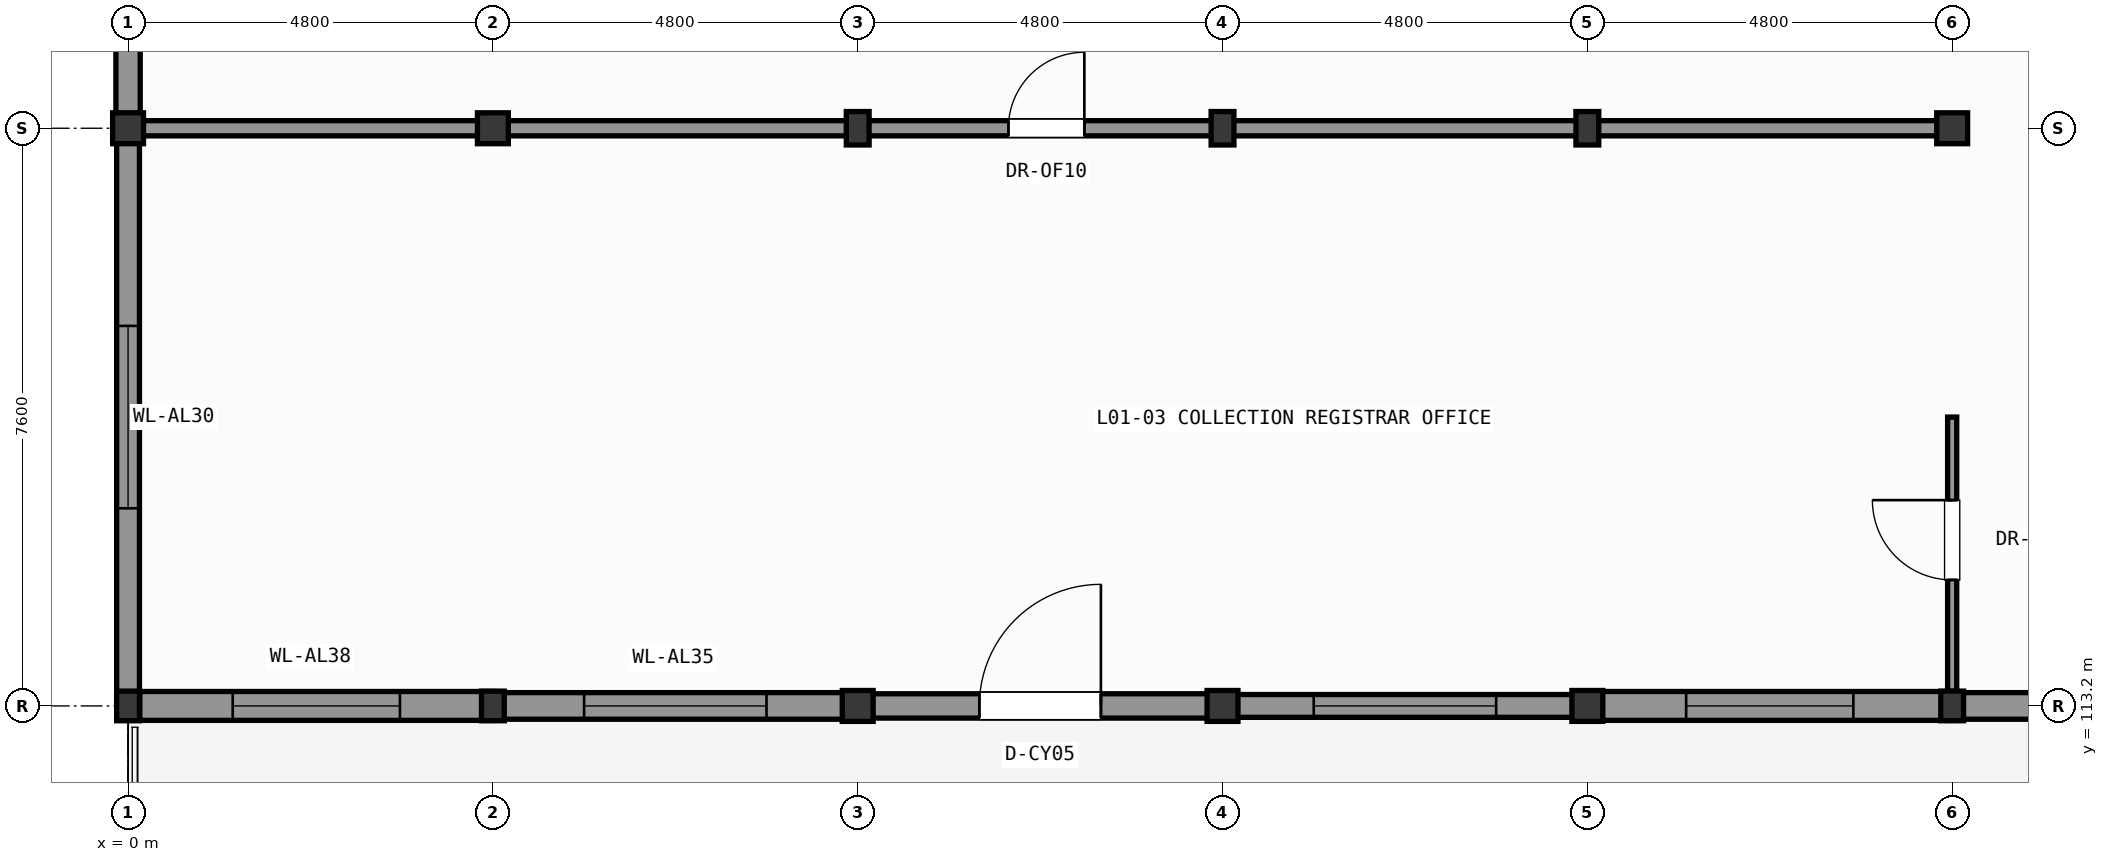
"""IFC4 building model, lengths in metres.
Left out: names, types, materials, properties, quantities, classifications, styles, units other than length and angle.
Written with IfcOpenShell. Run it as: python <this file> out.ifc"""

import sys

from ifc_helpers import new_model, si_unit, direction, frame, frame_2d, origin, origin_2d, place, context, subcontext, project, spatial, rectangle, hollow_circle, i_section, extrude, element, fill, save


model = new_model("IFC4")
c1 = context("Model", 3, precision=1e-05, world=origin(), true_north=direction((0.0, 1.0)))
c2 = subcontext(c1, "Body", "Model", "MODEL_VIEW")
j1 = project(units=[si_unit("LENGTHUNIT", "METRE"), si_unit("PLANEANGLEUNIT", "RADIAN")], contexts=[c1])
p1 = place(None, origin())
s1 = spatial("IfcSite", under=j1, at=p1, CompositionType="ELEMENT")
p2 = place(p1, origin())
s2 = spatial("IfcBuilding", under=s1, at=p2, CompositionType="ELEMENT")
p3 = place(p2, origin())
s3 = spatial("IfcBuildingStorey", under=s2, at=p3, CompositionType="ELEMENT", Elevation=0.0)
p4 = place(p3, frame((0.0, 113.2, 0.0), z_axis=(0.0, 0.0, 1.0), x_axis=(1.0, 0.0, 0.0)))
e1 = element("IfcColumn", 1, at=p4, inside=s3, PredefinedType="COLUMN", context=c2, shape_type="SweptSolid", body=[
    extrude(i_section(OverallWidth=0.3, OverallDepth=0.39, WebThickness=0.011, FlangeThickness=0.019, FilletRadius=0.027, at=origin_2d()), origin(), (0.0, 0.0, 1.0), 7.8),
])
p5 = place(p3, frame((0.0, 120.8, 0.0), z_axis=(0.0, 0.0, 1.0), x_axis=(1.0, 0.0, 0.0)))
e2 = element("IfcColumn", 2, at=p5, inside=s3, PredefinedType="COLUMN", context=c2, shape_type="SweptSolid", body=[
    extrude(hollow_circle(Radius=0.203, WallThickness=0.02, at=origin_2d()), origin(), (0.0, 0.0, 1.0), 7.8),
])
p6 = place(p3, frame((4.8, 113.2, 0.0), z_axis=(0.0, 0.0, 1.0), x_axis=(1.0, 0.0, 0.0)))
e3 = element("IfcColumn", 3, at=p6, inside=s3, PredefinedType="COLUMN", context=c2, shape_type="SweptSolid", body=[
    extrude(i_section(OverallWidth=0.3, OverallDepth=0.39, WebThickness=0.011, FlangeThickness=0.019, FilletRadius=0.027, at=origin_2d()), origin(), (0.0, 0.0, 1.0), 7.8),
])
for number, where, z_axis, x_axis in (
    (4, (4.8, 120.8, 0.0), (0.0, 0.0, 1.0), (1.0, 0.0, 0.0)),
    (5, (9.6, 113.2, 0.0), (0.0, 0.0, 1.0), (1.0, 0.0, 0.0)),
):
    element("IfcColumn", number, at=place(p3, frame(where, z_axis=z_axis, x_axis=x_axis)), inside=s3, PredefinedType="COLUMN", context=c2, shape_type="SweptSolid", body=[
        extrude(hollow_circle(Radius=0.203, WallThickness=0.02, at=origin_2d()), origin(), (0.0, 0.0, 1.0), 7.8),
    ])
p7 = place(p3, frame((9.6, 120.8, 0.0), z_axis=(0.0, 0.0, 1.0), x_axis=(1.0, 0.0, 0.0)))
e6 = element("IfcColumn", 6, at=p7, inside=s3, PredefinedType="COLUMN", context=c2, shape_type="SweptSolid", body=[
    extrude(i_section(OverallWidth=0.3, OverallDepth=0.44, WebThickness=0.011, FlangeThickness=0.021, FilletRadius=0.027, at=origin_2d()), origin(), (0.0, 0.0, 1.0), 7.8),
])
p8 = place(p3, frame((14.4, 113.2, 0.0), z_axis=(0.0, 0.0, 1.0), x_axis=(1.0, 0.0, 0.0)))
e7 = element("IfcColumn", 7, at=p8, inside=s3, PredefinedType="COLUMN", context=c2, shape_type="SweptSolid", body=[
    extrude(hollow_circle(Radius=0.203, WallThickness=0.02, at=origin_2d()), origin(), (0.0, 0.0, 1.0), 7.8),
])
p9 = place(p3, frame((14.4, 120.8, 0.0), z_axis=(0.0, 0.0, 1.0), x_axis=(1.0, 0.0, 0.0)))
e8 = element("IfcColumn", 8, at=p9, inside=s3, PredefinedType="COLUMN", context=c2, shape_type="SweptSolid", body=[
    extrude(i_section(OverallWidth=0.3, OverallDepth=0.44, WebThickness=0.011, FlangeThickness=0.021, FilletRadius=0.027, at=origin_2d()), origin(), (0.0, 0.0, 1.0), 7.8),
])
p10 = place(p3, frame((19.2, 113.2, 0.0), z_axis=(0.0, 0.0, 1.0), x_axis=(1.0, 0.0, 0.0)))
e9 = element("IfcColumn", 9, at=p10, inside=s3, PredefinedType="COLUMN", context=c2, shape_type="SweptSolid", body=[
    extrude(hollow_circle(Radius=0.203, WallThickness=0.02, at=origin_2d()), origin(), (0.0, 0.0, 1.0), 7.8),
])
p11 = place(p3, frame((19.2, 120.8, 0.0), z_axis=(0.0, 0.0, 1.0), x_axis=(1.0, 0.0, 0.0)))
e10 = element("IfcColumn", 10, at=p11, inside=s3, PredefinedType="COLUMN", context=c2, shape_type="SweptSolid", body=[
    extrude(i_section(OverallWidth=0.3, OverallDepth=0.44, WebThickness=0.011, FlangeThickness=0.021, FilletRadius=0.027, at=origin_2d()), origin(), (0.0, 0.0, 1.0), 7.8),
])
p12 = place(p3, frame((24.0, 113.2, 0.0), z_axis=(0.0, 0.0, 1.0), x_axis=(1.0, 0.0, 0.0)))
e11 = element("IfcColumn", 11, at=p12, inside=s3, PredefinedType="COLUMN", context=c2, shape_type="SweptSolid", body=[
    extrude(i_section(OverallWidth=0.3, OverallDepth=0.39, WebThickness=0.011, FlangeThickness=0.019, FilletRadius=0.027, at=origin_2d()), origin(), (0.0, 0.0, 1.0), 7.8),
])
p13 = place(p3, frame((24.0, 120.8, 0.0), z_axis=(0.0, 0.0, 1.0), x_axis=(1.0, 0.0, 0.0)))
e12 = element("IfcColumn", 12, at=p13, inside=s3, PredefinedType="COLUMN", context=c2, shape_type="SweptSolid", body=[
    extrude(hollow_circle(Radius=0.203, WallThickness=0.02, at=origin_2d()), origin(), (0.0, 0.0, 1.0), 7.8),
])
p14 = place(p3, frame((0.0, 120.8, 0.0), z_axis=(0.0, 0.0, 1.0), x_axis=(0.0, 1.0, 0.0)))
e13 = element("IfcWall", 13, at=p14, inside=s3, PredefinedType="SOLIDWALL", context=c2, shape_type="SweptSolid", body=[
    extrude(rectangle(XDim=7.6, YDim=0.32, at=frame_2d((3.8, 0.0))), origin(), (0.0, 0.0, 1.0), 7.295),
])
p15 = place(p14, frame((2.6, 0.0, 0.95)))
e14 = element("IfcOpeningElement", 14, at=p15, cuts=e13, PredefinedType="OPENING", context=c2, shape_type="SweptSolid", body=[
    extrude(rectangle(XDim=2.4, YDim=4.6, at=frame_2d((1.2, 2.3))), frame((0.0, 0.17, 0.0), z_axis=(0.0, -1.0, 0.0), x_axis=(1.0, 0.0, 0.0)), (0.0, 0.0, 1.0), 0.34),
])
p16 = place(p3, frame((0.0, 113.2, 0.0), z_axis=(0.0, 0.0, 1.0), x_axis=(0.0, 1.0, 0.0)))
e15 = element("IfcWall", 15, at=p16, inside=s3, PredefinedType="SOLIDWALL", context=c2, shape_type="SweptSolid", body=[
    extrude(rectangle(XDim=7.6, YDim=0.3, at=frame_2d((3.8, 0.0))), origin(), (0.0, 0.0, 1.0), 7.295),
])
p17 = place(p16, frame((2.6, 0.0, 0.95)))
e16 = element("IfcOpeningElement", 16, at=p17, cuts=e15, PredefinedType="OPENING", context=c2, shape_type="SweptSolid", body=[
    extrude(rectangle(XDim=2.4, YDim=3.0, at=frame_2d((1.2, 1.5))), frame((0.0, 0.16, 0.0), z_axis=(0.0, -1.0, 0.0), x_axis=(1.0, 0.0, 0.0)), (0.0, 0.0, 1.0), 0.32),
])
p18 = place(p3, frame((4.8, 113.2, 0.0), z_axis=(0.0, 0.0, 1.0), x_axis=(-1.0, 0.0, 0.0)))
e17 = element("IfcWall", 17, at=p18, inside=s3, PredefinedType="SOLIDWALL", context=c2, shape_type="SweptSolid", body=[
    extrude(rectangle(XDim=4.646, YDim=0.38, at=frame_2d((2.323, 0.0))), origin(), (0.0, 0.0, 1.0), 7.185),
])
p19 = place(p18, frame((1.223, 0.0, 0.95)))
e18 = element("IfcOpeningElement", 18, at=p19, cuts=e17, PredefinedType="OPENING", context=c2, shape_type="SweptSolid", body=[
    extrude(rectangle(XDim=2.2, YDim=4.2, at=frame_2d((1.1, 2.1))), frame((0.0, 0.2, 0.0), z_axis=(0.0, -1.0, 0.0), x_axis=(1.0, 0.0, 0.0)), (0.0, 0.0, 1.0), 0.4),
])
p20 = place(p3, frame((9.6, 113.2, 0.0), z_axis=(0.0, 0.0, 1.0), x_axis=(-1.0, 0.0, 0.0)))
e19 = element("IfcWall", 19, at=p20, inside=s3, PredefinedType="SOLIDWALL", context=c2, shape_type="SweptSolid", body=[
    extrude(rectangle(XDim=4.8, YDim=0.35, at=frame_2d((2.4, 0.0))), origin(), (0.0, 0.0, 1.0), 7.305),
])
p21 = place(p20, frame((1.2, 0.0, 0.95)))
e20 = element("IfcOpeningElement", 20, at=p21, cuts=e19, PredefinedType="OPENING", context=c2, shape_type="SweptSolid", body=[
    extrude(rectangle(XDim=2.4, YDim=4.6, at=frame_2d((1.2, 2.3))), frame((0.0, 0.185, 0.0), z_axis=(0.0, -1.0, 0.0), x_axis=(1.0, 0.0, 0.0)), (0.0, 0.0, 1.0), 0.37),
])
p22 = place(p3, frame((14.4, 113.2, 0.0), z_axis=(0.0, 0.0, 1.0), x_axis=(-1.0, 0.0, 0.0)))
e21 = element("IfcWall", 21, at=p22, inside=s3, PredefinedType="SOLIDWALL", context=c2, shape_type="SweptSolid", body=[
    extrude(rectangle(XDim=4.8, YDim=0.32, at=frame_2d((2.4, 0.0))), origin(), (0.0, 0.0, 1.0), 7.015),
])
p23 = place(p22, frame((1.6, 0.0, 0.0)))
e22 = element("IfcOpeningElement", 22, at=p23, cuts=e21, PredefinedType="OPENING", context=c2, shape_type="SweptSolid", body=[
    extrude(rectangle(XDim=1.6, YDim=2.4, at=frame_2d((0.8, 1.2))), frame((0.0, 0.17, 0.0), z_axis=(0.0, -1.0, 0.0), x_axis=(1.0, 0.0, 0.0)), (0.0, 0.0, 1.0), 0.34),
])
p24 = place(p3, frame((19.2, 113.2, 0.0), z_axis=(0.0, 0.0, 1.0), x_axis=(-1.0, 0.0, 0.0)))
e23 = element("IfcWall", 23, at=p24, inside=s3, PredefinedType="SOLIDWALL", context=c2, shape_type="SweptSolid", body=[
    extrude(rectangle(XDim=4.8, YDim=0.3, at=frame_2d((2.4, 0.0))), origin(), (0.0, 0.0, 1.0), 7.185),
])
p25 = place(p24, frame((1.2, 0.0, 0.95)))
e24 = element("IfcOpeningElement", 24, at=p25, cuts=e23, PredefinedType="OPENING", context=c2, shape_type="SweptSolid", body=[
    extrude(rectangle(XDim=2.4, YDim=3.0, at=frame_2d((1.2, 1.5))), frame((0.0, 0.16, 0.0), z_axis=(0.0, -1.0, 0.0), x_axis=(1.0, 0.0, 0.0)), (0.0, 0.0, 1.0), 0.32),
])
p26 = place(p3, frame((24.0, 113.2, 0.0), z_axis=(0.0, 0.0, 1.0), x_axis=(-1.0, 0.0, 0.0)))
e25 = element("IfcWall", 25, at=p26, inside=s3, PredefinedType="SOLIDWALL", context=c2, shape_type="SweptSolid", body=[
    extrude(rectangle(XDim=4.8, YDim=0.38, at=frame_2d((2.4, 0.0))), origin(), (0.0, 0.0, 1.0), 7.015),
])
p27 = place(p26, frame((1.3, 0.0, 0.95)))
e26 = element("IfcOpeningElement", 26, at=p27, cuts=e25, PredefinedType="OPENING", context=c2, shape_type="SweptSolid", body=[
    extrude(rectangle(XDim=2.2, YDim=4.2, at=frame_2d((1.1, 2.1))), frame((0.0, 0.2, 0.0), z_axis=(0.0, -1.0, 0.0), x_axis=(1.0, 0.0, 0.0)), (0.0, 0.0, 1.0), 0.4),
])
p28 = place(p3, frame((32.0, 113.2, 0.0), z_axis=(0.0, 0.0, 1.0), x_axis=(-1.0, 0.0, 0.0)))
e27 = element("IfcWall", 27, at=p28, inside=s3, PredefinedType="SOLIDWALL", context=c2, shape_type="SweptSolid", body=[
    extrude(rectangle(XDim=8.0, YDim=0.35, at=frame_2d((4.0, 0.0))), origin(), (0.0, 0.0, 1.0), 7.185),
])
p29 = place(p28, frame((1.467, 0.0, 0.95)))
e28 = element("IfcOpeningElement", 28, at=p29, cuts=e27, PredefinedType="OPENING", context=c2, shape_type="SweptSolid", body=[
    extrude(rectangle(XDim=2.4, YDim=4.6, at=frame_2d((1.2, 2.3))), frame((0.0, 0.185, 0.0), z_axis=(0.0, -1.0, 0.0), x_axis=(1.0, 0.0, 0.0)), (0.0, 0.0, 1.0), 0.37),
])
p30 = place(p28, frame((4.133, 0.0, 0.95)))
e29 = element("IfcOpeningElement", 29, at=p30, cuts=e27, PredefinedType="OPENING", context=c2, shape_type="SweptSolid", body=[
    extrude(rectangle(XDim=2.4, YDim=4.6, at=frame_2d((1.2, 2.3))), frame((0.0, 0.185, 0.0), z_axis=(0.0, -1.0, 0.0), x_axis=(1.0, 0.0, 0.0)), (0.0, 0.0, 1.0), 0.37),
])
p31 = place(p3, frame((0.164, 120.8, 0.0), z_axis=(0.0, 0.0, 1.0), x_axis=(1.0, 0.0, 0.0)))
e30 = element("IfcWall", 30, at=p31, inside=s3, PredefinedType="PARTITIONING", context=c2, shape_type="SweptSolid", body=[
    extrude(rectangle(XDim=23.836, YDim=0.2, at=frame_2d((11.918, 0.0))), origin(), (0.0, 0.0, 1.0), 6.965),
])
p32 = place(p31, frame((11.418, 0.0, 0.0)))
e31 = element("IfcOpeningElement", 31, at=p32, cuts=e30, PredefinedType="OPENING", context=c2, shape_type="SweptSolid", body=[
    extrude(rectangle(XDim=1.0, YDim=2.15, at=frame_2d((0.5, 1.075))), frame((0.0, 0.11, 0.0), z_axis=(0.0, -1.0, 0.0), x_axis=(1.0, 0.0, 0.0)), (0.0, 0.0, 1.0), 0.22),
])
p33 = place(p3, frame((24.0, 113.394, 0.0), z_axis=(0.0, 0.0, 1.0), x_axis=(0.0, 1.0, 0.0)))
e32 = element("IfcWall", 32, at=p33, inside=s3, PredefinedType="PARTITIONING", context=c2, shape_type="SweptSolid", body=[
    extrude(rectangle(XDim=3.606, YDim=0.12, at=frame_2d((1.803, 0.0))), origin(), (0.0, 0.0, 1.0), 6.965),
])
p34 = place(p33, frame((1.464, 0.0, 0.0)))
e33 = element("IfcOpeningElement", 33, at=p34, cuts=e32, PredefinedType="OPENING", context=c2, shape_type="SweptSolid", body=[
    extrude(rectangle(XDim=1.05, YDim=2.2, at=frame_2d((0.525, 1.1))), frame((0.0, 0.07, 0.0), z_axis=(0.0, -1.0, 0.0), x_axis=(1.0, 0.0, 0.0)), (0.0, 0.0, 1.0), 0.14),
])
p35 = place(p17, origin())
e34 = element("IfcWindow", 34, at=p35, inside=s3, PartitioningType="SINGLE_PANEL", PredefinedType="WINDOW", context=c2, shape_type="SweptSolid", body=[
    extrude(rectangle(XDim=2.4, YDim=3.0, at=frame_2d((1.2, 1.5))), frame((0.0, 0.03, 0.0), z_axis=(0.0, -1.0, 0.0), x_axis=(1.0, 0.0, 0.0)), (0.0, 0.0, 1.0), 0.06),
])
fill(e16, e34)
p36 = place(p19, origin())
e35 = element("IfcWindow", 35, at=p36, inside=s3, PartitioningType="SINGLE_PANEL", PredefinedType="WINDOW", context=c2, shape_type="SweptSolid", body=[
    extrude(rectangle(XDim=2.2, YDim=4.2, at=frame_2d((1.1, 2.1))), frame((0.0, 0.03, 0.0), z_axis=(0.0, -1.0, 0.0), x_axis=(1.0, 0.0, 0.0)), (0.0, 0.0, 1.0), 0.06),
])
fill(e18, e35)
p37 = place(p21, origin())
e36 = element("IfcWindow", 36, at=p37, inside=s3, PartitioningType="SINGLE_PANEL", PredefinedType="WINDOW", context=c2, shape_type="SweptSolid", body=[
    extrude(rectangle(XDim=2.4, YDim=4.6, at=frame_2d((1.2, 2.3))), frame((0.0, 0.03, 0.0), z_axis=(0.0, -1.0, 0.0), x_axis=(1.0, 0.0, 0.0)), (0.0, 0.0, 1.0), 0.06),
])
fill(e20, e36)
p38 = place(p23, origin())
e37 = element("IfcDoor", 37, at=p38, inside=s3, OperationType="SINGLE_SWING_LEFT", PredefinedType="DOOR", context=c2, shape_type="SweptSolid", body=[
    extrude(rectangle(XDim=1.6, YDim=2.4, at=frame_2d((0.8, 1.2))), frame((0.0, 0.025, 0.0), z_axis=(0.0, -1.0, 0.0), x_axis=(1.0, 0.0, 0.0)), (0.0, 0.0, 1.0), 0.05),
])
fill(e22, e37)
p39 = place(p25, origin())
e38 = element("IfcWindow", 38, at=p39, inside=s3, PartitioningType="SINGLE_PANEL", PredefinedType="WINDOW", context=c2, shape_type="SweptSolid", body=[
    extrude(rectangle(XDim=2.4, YDim=3.0, at=frame_2d((1.2, 1.5))), frame((0.0, 0.03, 0.0), z_axis=(0.0, -1.0, 0.0), x_axis=(1.0, 0.0, 0.0)), (0.0, 0.0, 1.0), 0.06),
])
fill(e24, e38)
p40 = place(p27, origin())
e39 = element("IfcWindow", 39, at=p40, inside=s3, PartitioningType="SINGLE_PANEL", PredefinedType="WINDOW", context=c2, shape_type="SweptSolid", body=[
    extrude(rectangle(XDim=2.2, YDim=4.2, at=frame_2d((1.1, 2.1))), frame((0.0, 0.03, 0.0), z_axis=(0.0, -1.0, 0.0), x_axis=(1.0, 0.0, 0.0)), (0.0, 0.0, 1.0), 0.06),
])
fill(e26, e39)
p41 = place(p32, origin())
e40 = element("IfcDoor", 40, at=p41, inside=s3, OperationType="SINGLE_SWING_RIGHT", PredefinedType="DOOR", context=c2, shape_type="SweptSolid", body=[
    extrude(rectangle(XDim=1.0, YDim=2.15, at=frame_2d((0.5, 1.075))), frame((0.0, 0.025, 0.0), z_axis=(0.0, -1.0, 0.0), x_axis=(1.0, 0.0, 0.0)), (0.0, 0.0, 1.0), 0.05),
])
fill(e31, e40)
p42 = place(p34, origin())
e41 = element("IfcDoor", 41, at=p42, inside=s3, OperationType="SINGLE_SWING_RIGHT", PredefinedType="DOOR", context=c2, shape_type="SweptSolid", body=[
    extrude(rectangle(XDim=1.05, YDim=2.2, at=frame_2d((0.525, 1.1))), frame((0.0, 0.025, 0.0), z_axis=(0.0, -1.0, 0.0), x_axis=(1.0, 0.0, 0.0)), (0.0, 0.0, 1.0), 0.05),
])
fill(e33, e41)
save(model, sys.argv[1])
